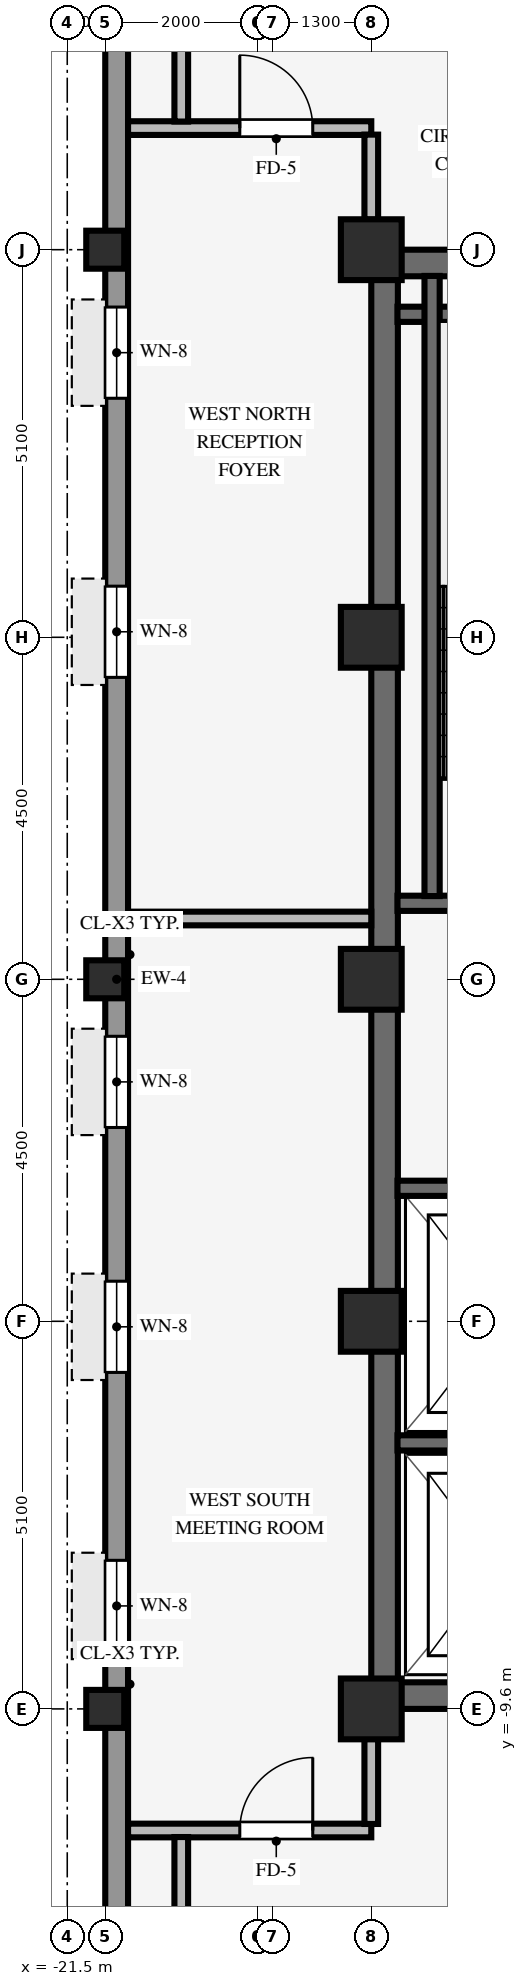
"""IFC4 building model, lengths in metres.
Left out: names, types, materials, properties, quantities, classifications, styles, units other than length and angle.
Written with IfcOpenShell. Run it as: python <this file> out.ifc"""

import sys

from ifc_helpers import new_model, si_unit, direction, frame, frame_2d, origin, origin_2d, place, context, subcontext, project, spatial, rectangle, hollow_rectangle, extrude, source, transform, mapped, element, fill, save


model = new_model("IFC4")
c1 = context("Model", 3, precision=1e-05, world=origin(), true_north=direction((0.0, 1.0)))
c2 = subcontext(c1, "Body", "Model", "MODEL_VIEW")
j1 = project(units=[si_unit("LENGTHUNIT", "METRE"), si_unit("PLANEANGLEUNIT", "RADIAN")], contexts=[c1])
p1 = place(None, origin())
s1 = spatial("IfcSite", under=j1, at=p1, CompositionType="ELEMENT")
p2 = place(p1, origin())
s2 = spatial("IfcBuilding", under=s1, at=p2, CompositionType="ELEMENT")
p3 = place(p2, frame((0.0, 0.0, 276.2)))
s3 = spatial("IfcBuildingStorey", under=s2, at=p3, CompositionType="ELEMENT", Elevation=276.2)
for number, where, z_axis, x_axis in (
    (1, (-17.5, -9.425, 0.0), (0.0, 0.0, 1.0), (1.0, 0.0, 0.0)),
    (2, (-17.5, 9.425, 0.0), (0.0, 0.0, 1.0), (1.0, 0.0, 0.0)),
):
    element("IfcWall", number, at=place(p3, frame(where, z_axis=z_axis, x_axis=x_axis)), inside=s3, PredefinedType="SHEAR", context=c2, shape_type="SweptSolid", body=[
        extrude(rectangle(XDim=8.5, YDim=0.35, at=frame_2d((4.25, 0.0))), origin(), (0.0, 0.0, 1.0), 3.37),
    ])
p4 = place(p3, frame((-17.325, -9.255, 0.0), z_axis=(0.0, 0.0, 1.0), x_axis=(0.0, 1.0, 0.0)))
e3 = element("IfcWall", 3, at=p4, inside=s3, PredefinedType="SHEAR", context=c2, shape_type="SweptSolid", body=[
    extrude(rectangle(XDim=18.51, YDim=0.35, at=frame_2d((9.255, 0.0))), origin(), (0.0, 0.0, 1.0), 3.37),
])
for number, where, z_axis, x_axis in (
    (4, (-17.5, -9.6, 0.0), (0.0, 0.0, 1.0), (1.0, 0.0, 0.0)),
    (5, (-17.5, -4.5, 0.0), (0.0, 0.0, 1.0), (1.0, 0.0, 0.0)),
    (6, (-17.5, 4.5, 0.0), (0.0, 0.0, 1.0), (1.0, 0.0, 0.0)),
    (7, (-17.5, 9.6, 0.0), (0.0, 0.0, 1.0), (1.0, 0.0, 0.0)),
    (8, (-17.5, 0.0, 0.0), (0.0, 0.0, 1.0), (1.0, 0.0, 0.0)),
):
    element("IfcColumn", number, at=place(p3, frame(where, z_axis=z_axis, x_axis=x_axis)), inside=s3, PredefinedType="COLUMN", context=c2, shape_type="SweptSolid", body=[
        extrude(rectangle(XDim=0.8, YDim=0.8, at=origin_2d()), origin(), (0.0, 0.0, 1.0), 3.37),
    ])
for number, where, z_axis, x_axis in (
    (9, (-21.0, -9.6, 0.0), (0.0, 0.0, 1.0), (1.0, 0.0, 0.0)),
    (10, (-21.0, 0.0, 0.0), (0.0, 0.0, 1.0), (1.0, 0.0, 0.0)),
    (11, (-21.0, 9.6, 0.0), (0.0, 0.0, 1.0), (1.0, 0.0, 0.0)),
):
    element("IfcColumn", number, at=place(p3, frame(where, z_axis=z_axis, x_axis=x_axis)), inside=s3, PredefinedType="COLUMN", context=c2, shape_type="SweptSolid", body=[
        extrude(hollow_rectangle(XDim=0.5, YDim=0.5, WallThickness=0.032, InnerFilletRadius=0.032, OuterFilletRadius=0.064, at=origin_2d()), origin(), (0.0, 0.0, 1.0), 3.37),
    ])
p5 = place(p3, frame((-20.85, -17.004, 0.0), z_axis=(0.0, 0.0, 1.0), x_axis=(0.0, 1.0, 0.0)))
e12 = element("IfcWall", 12, at=p5, inside=s3, PredefinedType="STANDARD", context=c2, shape_type="SweptSolid", body=[
    extrude(rectangle(XDim=34.008, YDim=0.3, at=frame_2d((17.004, 0.0))), origin(), (0.0, 0.0, 1.0), 2.705),
])
p6 = place(p5, frame((1.786, 0.0, 0.8)))
e13 = element("IfcOpeningElement", 13, at=p6, cuts=e12, PredefinedType="OPENING", context=c2, shape_type="SweptSolid", body=[
    extrude(rectangle(XDim=1.2, YDim=1.48, at=frame_2d((0.6, 0.74))), frame((0.0, 0.16, 0.0), z_axis=(0.0, -1.0, 0.0), x_axis=(1.0, 0.0, 0.0)), (0.0, 0.0, 1.0), 0.32),
])
p7 = place(p5, frame((8.159, 0.0, 0.8)))
e14 = element("IfcOpeningElement", 14, at=p7, cuts=e12, PredefinedType="OPENING", context=c2, shape_type="SweptSolid", body=[
    extrude(rectangle(XDim=1.2, YDim=1.48, at=frame_2d((0.6, 0.74))), frame((0.0, 0.16, 0.0), z_axis=(0.0, -1.0, 0.0), x_axis=(1.0, 0.0, 0.0)), (0.0, 0.0, 1.0), 0.32),
])
p8 = place(p5, frame((11.831, 0.0, 0.8)))
e15 = element("IfcOpeningElement", 15, at=p8, cuts=e12, PredefinedType="OPENING", context=c2, shape_type="SweptSolid", body=[
    extrude(rectangle(XDim=1.2, YDim=1.48, at=frame_2d((0.6, 0.74))), frame((0.0, 0.16, 0.0), z_axis=(0.0, -1.0, 0.0), x_axis=(1.0, 0.0, 0.0)), (0.0, 0.0, 1.0), 0.32),
])
p9 = place(p5, frame((15.054, 0.0, 0.8)))
e16 = element("IfcOpeningElement", 16, at=p9, cuts=e12, PredefinedType="OPENING", context=c2, shape_type="SweptSolid", body=[
    extrude(rectangle(XDim=1.2, YDim=1.48, at=frame_2d((0.6, 0.74))), frame((0.0, 0.16, 0.0), z_axis=(0.0, -1.0, 0.0), x_axis=(1.0, 0.0, 0.0)), (0.0, 0.0, 1.0), 0.32),
])
p10 = place(p5, frame((20.977, 0.0, 0.8)))
e17 = element("IfcOpeningElement", 17, at=p10, cuts=e12, PredefinedType="OPENING", context=c2, shape_type="SweptSolid", body=[
    extrude(rectangle(XDim=1.2, YDim=1.48, at=frame_2d((0.6, 0.74))), frame((0.0, 0.16, 0.0), z_axis=(0.0, -1.0, 0.0), x_axis=(1.0, 0.0, 0.0)), (0.0, 0.0, 1.0), 0.32),
])
p11 = place(p5, frame((24.649, 0.0, 0.8)))
e18 = element("IfcOpeningElement", 18, at=p11, cuts=e12, PredefinedType="OPENING", context=c2, shape_type="SweptSolid", body=[
    extrude(rectangle(XDim=1.2, YDim=1.48, at=frame_2d((0.6, 0.74))), frame((0.0, 0.16, 0.0), z_axis=(0.0, -1.0, 0.0), x_axis=(1.0, 0.0, 0.0)), (0.0, 0.0, 1.0), 0.32),
])
p12 = place(p5, frame((31.022, 0.0, 0.8)))
e19 = element("IfcOpeningElement", 19, at=p12, cuts=e12, PredefinedType="OPENING", context=c2, shape_type="SweptSolid", body=[
    extrude(rectangle(XDim=1.2, YDim=1.48, at=frame_2d((0.6, 0.74))), frame((0.0, 0.16, 0.0), z_axis=(0.0, -1.0, 0.0), x_axis=(1.0, 0.0, 0.0)), (0.0, 0.0, 1.0), 0.32),
])
for number, where, z_axis, x_axis in (
    (20, (-17.155, 1.0, 0.0), (0.0, 0.0, 1.0), (1.0, 0.0, 0.0)),
    (21, (-17.155, 8.75, 0.0), (0.0, 0.0, 1.0), (1.0, 0.0, 0.0)),
):
    element("IfcWall", number, at=place(p3, frame(where, z_axis=z_axis, x_axis=x_axis)), inside=s3, PredefinedType="SHEAR", context=c2, shape_type="SweptSolid", body=[
        extrude(rectangle(XDim=3.62, YDim=0.2, at=frame_2d((1.81, 0.0))), origin(), (0.0, 0.0, 1.0), 3.37),
    ])
p13 = place(p3, frame((-16.7, 1.095, 0.0), z_axis=(0.0, 0.0, 1.0), x_axis=(0.0, 1.0, 0.0)))
e22 = element("IfcWall", 22, at=p13, inside=s3, PredefinedType="SHEAR", context=c2, shape_type="SweptSolid", body=[
    extrude(rectangle(XDim=8.16, YDim=0.2, at=frame_2d((4.08, 0.0))), origin(), (0.0, 0.0, 1.0), 3.37),
])
p14 = place(p3, frame((-17.155, -6.1, 0.0), z_axis=(0.0, 0.0, 1.0), x_axis=(1.0, 0.0, 0.0)))
e23 = element("IfcWall", 23, at=p14, inside=s3, PredefinedType="SHEAR", context=c2, shape_type="SweptSolid", body=[
    extrude(rectangle(XDim=2.905, YDim=0.2, at=frame_2d((1.453, 0.0))), origin(), (0.0, 0.0, 1.0), 3.37),
])
p15 = place(p3, frame((-17.155, -2.75, 0.0), z_axis=(0.0, 0.0, 1.0), x_axis=(1.0, 0.0, 0.0)))
e24 = element("IfcWall", 24, at=p15, inside=s3, PredefinedType="SHEAR", context=c2, shape_type="SweptSolid", body=[
    extrude(rectangle(XDim=2.71, YDim=0.2, at=frame_2d((1.355, 0.0))), origin(), (0.0, 0.0, 1.0), 3.37),
])
p16 = place(p3, frame((-20.7, -11.2, 0.0), z_axis=(0.0, 0.0, 1.0), x_axis=(1.0, 0.0, 0.0)))
e25 = element("IfcWall", 25, at=p16, inside=s3, PredefinedType="PARTITIONING", context=c2, shape_type="SweptSolid", body=[
    extrude(rectangle(XDim=3.2, YDim=0.18, at=frame_2d((1.6, 0.0))), origin(), (0.0, 0.0, 1.0), 3.36),
])
p17 = place(p16, frame((1.47, 0.0, 0.0)))
e26 = element("IfcOpeningElement", 26, at=p17, cuts=e25, PredefinedType="OPENING", context=c2, shape_type="SweptSolid", body=[
    extrude(rectangle(XDim=0.96, YDim=2.1, at=frame_2d((0.48, 1.05))), frame((0.0, 0.1, 0.0), z_axis=(0.0, -1.0, 0.0), x_axis=(1.0, 0.0, 0.0)), (0.0, 0.0, 1.0), 0.2),
])
p18 = place(p3, frame((-20.7, 0.8, 0.0), z_axis=(0.0, 0.0, 1.0), x_axis=(1.0, 0.0, 0.0)))
e27 = element("IfcWall", 27, at=p18, inside=s3, PredefinedType="PARTITIONING", context=c2, shape_type="SweptSolid", body=[
    extrude(rectangle(XDim=3.2, YDim=0.18, at=frame_2d((1.6, 0.0))), origin(), (0.0, 0.0, 1.0), 3.36),
])
p19 = place(p3, frame((-20.7, 11.2, 0.0), z_axis=(0.0, 0.0, 1.0), x_axis=(1.0, 0.0, 0.0)))
e28 = element("IfcWall", 28, at=p19, inside=s3, PredefinedType="PARTITIONING", context=c2, shape_type="SweptSolid", body=[
    extrude(rectangle(XDim=3.2, YDim=0.18, at=frame_2d((1.6, 0.0))), origin(), (0.0, 0.0, 1.0), 3.36),
])
p20 = place(p19, frame((1.47, 0.0, 0.0)))
e29 = element("IfcOpeningElement", 29, at=p20, cuts=e28, PredefinedType="OPENING", context=c2, shape_type="SweptSolid", body=[
    extrude(rectangle(XDim=0.96, YDim=2.1, at=frame_2d((0.48, 1.05))), frame((0.0, 0.1, 0.0), z_axis=(0.0, -1.0, 0.0), x_axis=(1.0, 0.0, 0.0)), (0.0, 0.0, 1.0), 0.2),
])
for number, where, z_axis, x_axis in (
    (30, (-20.0, -13.514, 0.0), (0.0, 0.0, 1.0), (0.0, 1.0, 0.0)),
    (31, (-20.0, 11.286, 0.0), (0.0, 0.0, 1.0), (0.0, 1.0, 0.0)),
):
    element("IfcWall", number, at=place(p3, frame(where, z_axis=z_axis, x_axis=x_axis)), inside=s3, PredefinedType="PARTITIONING", context=c2, shape_type="SweptSolid", body=[
        extrude(rectangle(XDim=2.228, YDim=0.18, at=frame_2d((1.114, 0.0))), origin(), (0.0, 0.0, 1.0), 3.36),
    ])
for number, where, z_axis, x_axis in (
    (32, (-17.5, -11.114, 0.0), (0.0, 0.0, 1.0), (0.0, 1.0, 0.0)),
    (33, (-17.5, 9.996, 0.0), (0.0, 0.0, 1.0), (0.0, 1.0, 0.0)),
):
    element("IfcWall", number, at=place(p3, frame(where, z_axis=z_axis, x_axis=x_axis)), inside=s3, PredefinedType="PARTITIONING", context=c2, shape_type="SweptSolid", body=[
        extrude(rectangle(XDim=1.118, YDim=0.18, at=frame_2d((0.559, 0.0))), origin(), (0.0, 0.0, 1.0), 2.892),
    ])
m1 = source(origin(), c2, "Body", "SweptSolid", [
    extrude(rectangle(XDim=1.2, YDim=1.48, at=frame_2d((0.6, 0.74))), frame((0.0, 0.03, 0.0), z_axis=(0.0, -1.0, 0.0), x_axis=(1.0, 0.0, 0.0)), (0.0, 0.0, 1.0), 0.06),
])
p21 = place(p7, origin())
e34 = element("IfcWindow", 34, at=p21, inside=s3, PartitioningType="SINGLE_PANEL", PredefinedType="WINDOW", context=c2, shape_type="MappedRepresentation", body=[
    mapped(m1, transform((0.0, 0.0, 0.0), scale=1.0)),
])
fill(e14, e34)
p22 = place(p8, origin())
e35 = element("IfcWindow", 35, at=p22, inside=s3, PartitioningType="SINGLE_PANEL", PredefinedType="WINDOW", context=c2, shape_type="MappedRepresentation", body=[
    mapped(m1, transform((0.0, 0.0, 0.0), scale=1.0)),
])
fill(e15, e35)
p23 = place(p9, origin())
e36 = element("IfcWindow", 36, at=p23, inside=s3, PartitioningType="SINGLE_PANEL", PredefinedType="WINDOW", context=c2, shape_type="MappedRepresentation", body=[
    mapped(m1, transform((0.0, 0.0, 0.0), scale=1.0)),
])
fill(e16, e36)
p24 = place(p10, origin())
e37 = element("IfcWindow", 37, at=p24, inside=s3, PartitioningType="SINGLE_PANEL", PredefinedType="WINDOW", context=c2, shape_type="MappedRepresentation", body=[
    mapped(m1, transform((0.0, 0.0, 0.0), scale=1.0)),
])
fill(e17, e37)
p25 = place(p11, origin())
e38 = element("IfcWindow", 38, at=p25, inside=s3, PartitioningType="SINGLE_PANEL", PredefinedType="WINDOW", context=c2, shape_type="MappedRepresentation", body=[
    mapped(m1, transform((0.0, 0.0, 0.0), scale=1.0)),
])
fill(e18, e38)
m2 = source(origin(), c2, "Body", "SweptSolid", [
    extrude(rectangle(XDim=0.96, YDim=2.1, at=frame_2d((0.48, 1.05))), frame((0.0, 0.025, 0.0), z_axis=(0.0, -1.0, 0.0), x_axis=(1.0, 0.0, 0.0)), (0.0, 0.0, 1.0), 0.05),
])
p26 = place(p17, origin())
e39 = element("IfcDoor", 39, at=p26, inside=s3, OperationType="SINGLE_SWING_RIGHT", PredefinedType="DOOR", context=c2, shape_type="MappedRepresentation", body=[
    mapped(m2, transform((0.0, 0.0, 0.0), scale=1.0)),
])
fill(e26, e39)
p27 = place(p20, origin())
e40 = element("IfcDoor", 40, at=p27, inside=s3, OperationType="SINGLE_SWING_LEFT", PredefinedType="DOOR", context=c2, shape_type="MappedRepresentation", body=[
    mapped(m2, transform((0.0, 0.0, 0.0), scale=1.0)),
])
fill(e29, e40)
save(model, sys.argv[1])
